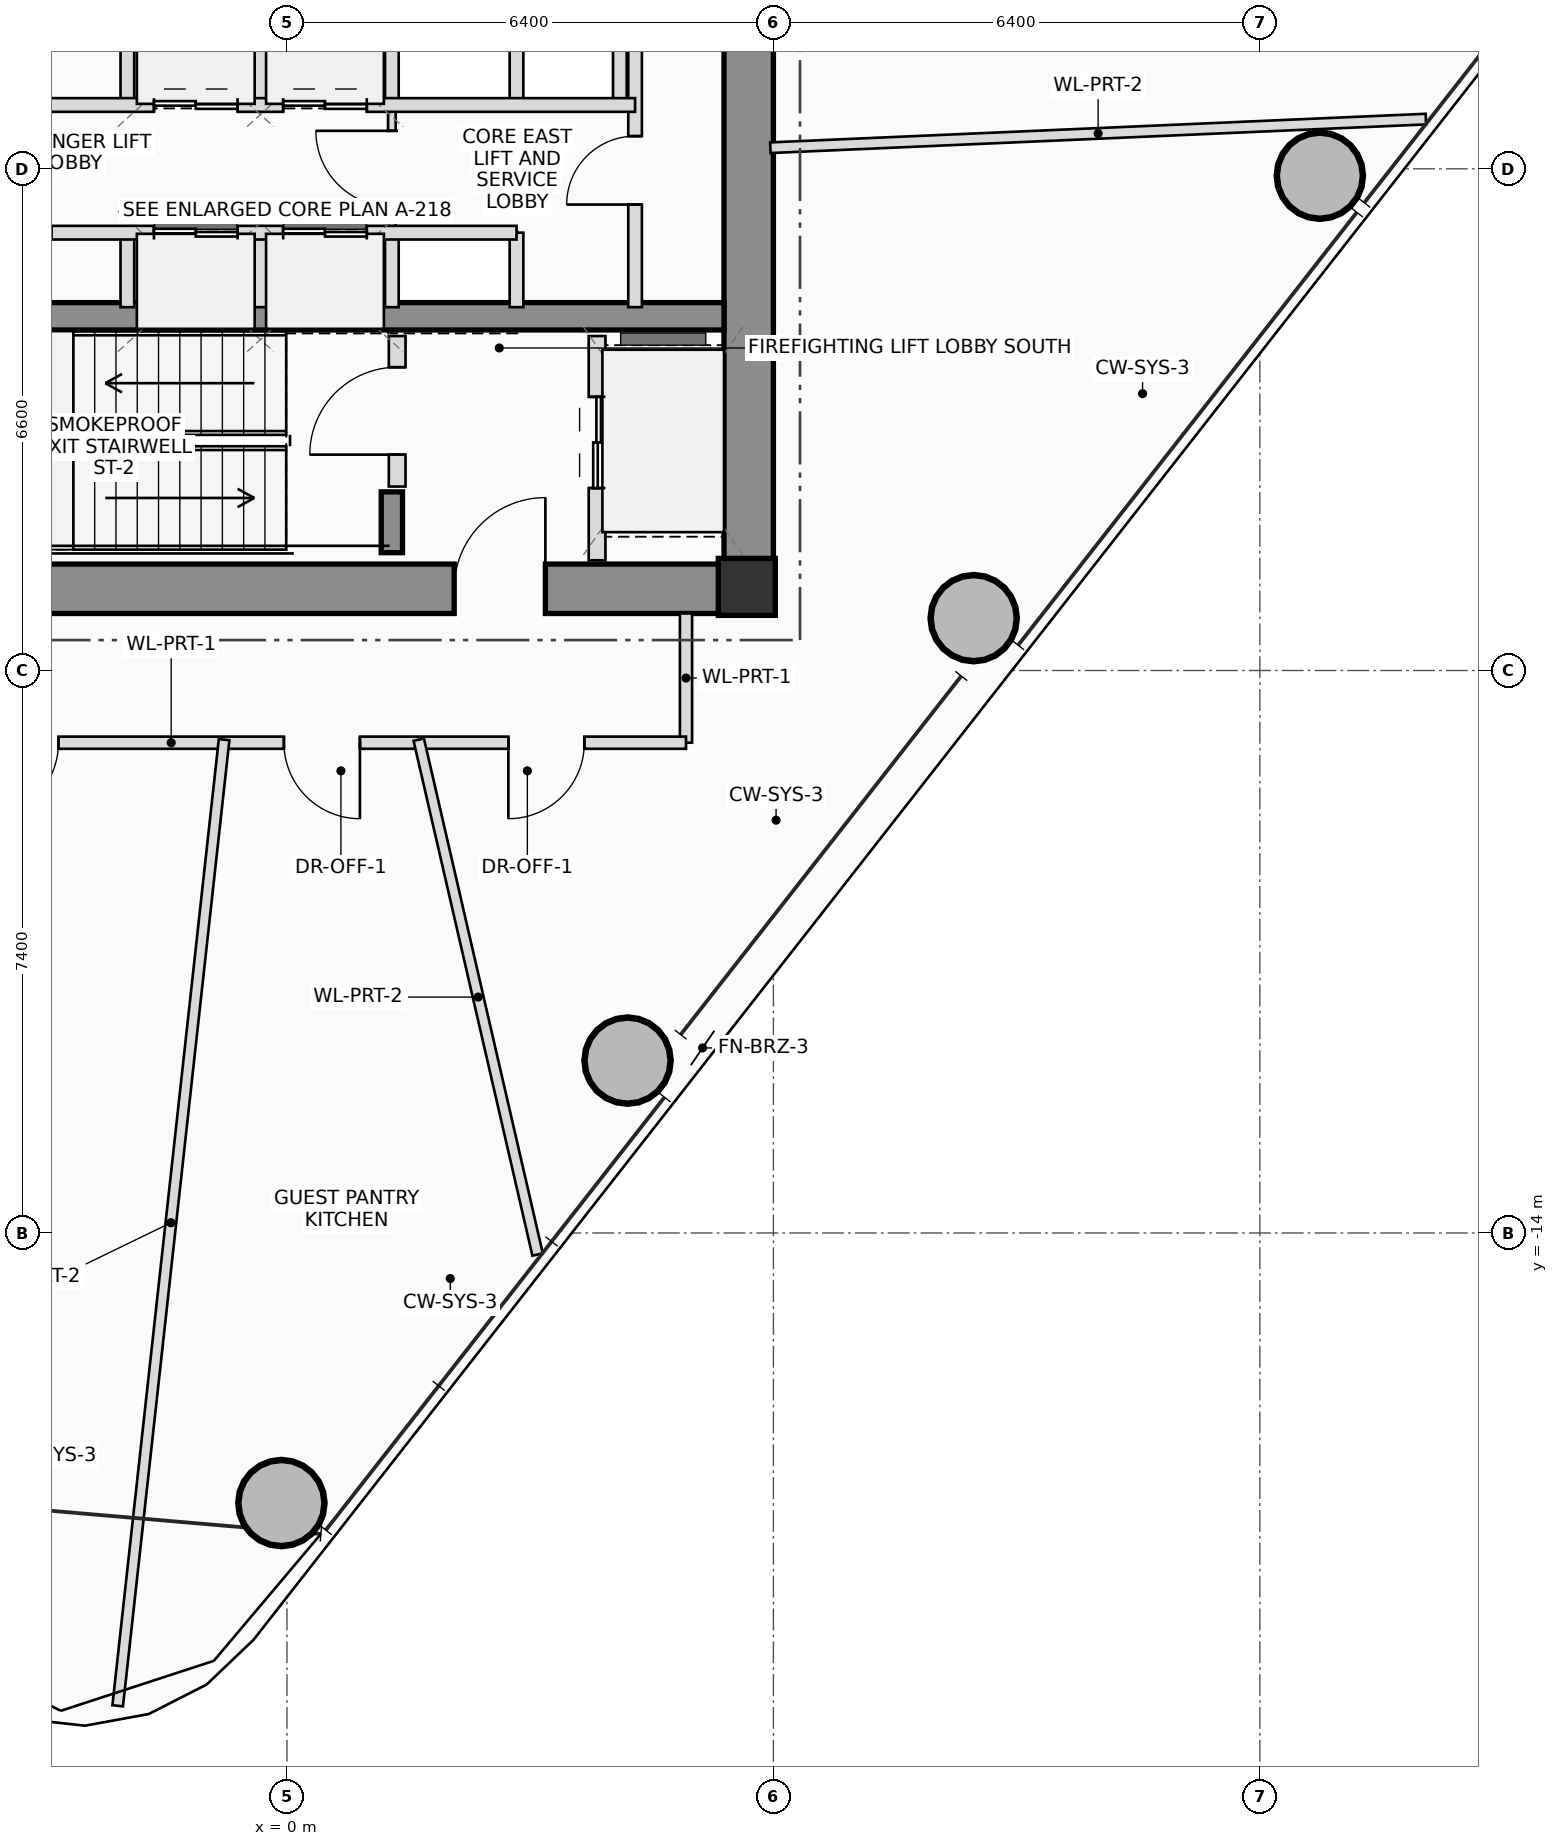
"""IFC4 building model, lengths in metres.
Left out: names, types, materials, properties, quantities, classifications, styles, units other than length and angle.
Written with IfcOpenShell. Run it as: python <this file> out.ifc"""

import sys

from ifc_helpers import new_model, si_unit, direction, frame, frame_2d, origin, origin_2d, place, context, subcontext, project, spatial, rectangle, hollow_circle, extrude, source, transform, mapped, element, fill, save


model = new_model("IFC4")
c1 = context("Model", 3, precision=1e-05, world=origin(), true_north=direction((0.0, 1.0)))
c2 = subcontext(c1, "Body", "Model", "MODEL_VIEW")
j1 = project(units=[si_unit("LENGTHUNIT", "METRE"), si_unit("PLANEANGLEUNIT", "RADIAN")], contexts=[c1])
p1 = place(None, origin())
s1 = spatial("IfcSite", under=j1, at=p1, CompositionType="ELEMENT")
p2 = place(p1, origin())
s2 = spatial("IfcBuilding", under=s1, at=p2, CompositionType="ELEMENT")
p3 = place(p2, frame((0.0, 0.0, 205.25)))
s3 = spatial("IfcBuildingStorey", under=s2, at=p3, CompositionType="ELEMENT", Elevation=205.25)
m1 = source(origin(), c2, "Body", "SweptSolid", [
    extrude(rectangle(XDim=0.75, YDim=0.75, at=origin_2d()), origin(), (0.0, 0.0, 1.0), 3.45),
])
p4 = place(p3, frame((6.05, -5.5, 0.0), z_axis=(0.0, 0.0, 1.0), x_axis=(1.0, 0.0, 0.0)))
e1 = element("IfcColumn", 1, at=p4, inside=s3, PredefinedType="COLUMN", context=c2, shape_type="MappedRepresentation", body=[
    mapped(m1, transform((0.0, 0.0, 0.0), scale=1.0)),
])
p5 = place(p3, frame((-6.4, -5.525, 0.0), z_axis=(0.0, 0.0, 1.0), x_axis=(1.0, 0.0, 0.0)))
e2 = element("IfcWall", 2, at=p5, inside=s3, PredefinedType="SHEAR", context=c2, shape_type="SweptSolid", body=[
    extrude(rectangle(XDim=12.8, YDim=0.65, at=frame_2d((6.4, 0.0))), origin(), (0.0, 0.0, 1.0), 3.45),
])
p6 = place(p5, frame((8.6, 0.0, 0.0)))
e3 = element("IfcOpeningElement", 3, at=p6, cuts=e2, PredefinedType="OPENING", context=c2, shape_type="SweptSolid", body=[
    extrude(rectangle(XDim=1.2, YDim=2.2, at=frame_2d((0.6, 1.1))), frame((0.0, 0.335, 0.0), z_axis=(0.0, -1.0, 0.0), x_axis=(1.0, 0.0, 0.0)), (0.0, 0.0, 1.0), 0.67),
])
p7 = place(p3, frame((6.075, -5.2, 0.0), z_axis=(0.0, 0.0, 1.0), x_axis=(0.0, 1.0, 0.0)))
e4 = element("IfcWall", 4, at=p7, inside=s3, PredefinedType="SHEAR", context=c2, shape_type="SweptSolid", body=[
    extrude(rectangle(XDim=10.4, YDim=0.65, at=frame_2d((5.2, 0.0))), origin(), (0.0, 0.0, 1.0), 3.45),
])
p8 = place(p3, frame((-5.75, -1.94, 0.0), z_axis=(0.0, 0.0, 1.0), x_axis=(1.0, 0.0, 0.0)))
e5 = element("IfcWall", 5, at=p8, inside=s3, PredefinedType="SHEAR", context=c2, shape_type="SweptSolid", body=[
    extrude(rectangle(XDim=11.5, YDim=0.36, at=frame_2d((5.75, 0.0))), origin(), (0.0, 0.0, 1.0), 3.45),
])
p9 = place(p3, frame((1.38, -5.05, 0.0), z_axis=(0.0, 0.0, 1.0), x_axis=(0.0, 1.0, 0.0)))
e6 = element("IfcWall", 6, at=p9, inside=s3, PredefinedType="SHEAR", context=c2, shape_type="SweptSolid", body=[
    extrude(rectangle(XDim=0.8, YDim=0.28, at=frame_2d((0.4, 0.0))), origin(), (0.0, 0.0, 1.0), 3.45),
])
m2 = source(origin(), c2, "Body", "SweptSolid", [
    extrude(hollow_circle(Radius=0.575, WallThickness=0.042, at=origin_2d()), origin(), (0.0, 0.0, 1.0), 3.45),
])
for number, where, z_axis, x_axis in (
    (7, (-0.073, -17.553, 0.0), (0.0, 0.0, 1.0), (1.0, 0.0, 0.0)),
    (8, (4.481, -11.732, 0.0), (0.0, 0.0, 1.0), (1.0, 0.0, 0.0)),
    (9, (9.035, -5.911, 0.0), (0.0, 0.0, 1.0), (1.0, 0.0, 0.0)),
    (10, (13.59, -0.09, 0.0), (0.0, 0.0, 1.0), (1.0, 0.0, 0.0)),
):
    element("IfcColumn", number, at=place(p3, frame(where, z_axis=z_axis, x_axis=x_axis)), inside=s3, PredefinedType="COLUMN", context=c2, shape_type="MappedRepresentation", body=[
        mapped(m2, transform((0.0, 0.0, 0.0), scale=1.0)),
    ])
p10 = place(p3, frame((1.45, -4.18, 0.0), z_axis=(0.0, 0.0, 1.0), x_axis=(0.0, 1.0, 0.0)))
e11 = element("IfcWall", 11, at=p10, inside=s3, PredefinedType="PLUMBINGWALL", context=c2, shape_type="SweptSolid", body=[
    extrude(rectangle(XDim=1.98, YDim=0.22, at=frame_2d((0.99, 0.0))), origin(), (0.0, 0.0, 1.0), 3.25),
])
p11 = place(p10, frame((0.42, 0.0, 0.0)))
e12 = element("IfcOpeningElement", 12, at=p11, cuts=e11, PredefinedType="OPENING", context=c2, shape_type="SweptSolid", body=[
    extrude(rectangle(XDim=1.15, YDim=2.15, at=frame_2d((0.575, 1.075))), frame((0.0, 0.12, 0.0), z_axis=(0.0, -1.0, 0.0), x_axis=(1.0, 0.0, 0.0)), (0.0, 0.0, 1.0), 0.24),
])
p12 = place(p3, frame((4.08, -5.15, 0.0), z_axis=(0.0, 0.0, 1.0), x_axis=(0.0, 1.0, 0.0)))
e13 = element("IfcWall", 13, at=p12, inside=s3, PredefinedType="PLUMBINGWALL", context=c2, shape_type="SweptSolid", body=[
    extrude(rectangle(XDim=2.95, YDim=0.22, at=frame_2d((1.475, 0.0))), origin(), (0.0, 0.0, 1.0), 3.25),
])
p13 = place(p12, frame((0.95, 0.0, 0.0)))
e14 = element("IfcOpeningElement", 14, at=p13, cuts=e13, PredefinedType="OPENING", context=c2, shape_type="SweptSolid", body=[
    extrude(rectangle(XDim=1.2, YDim=2.25, at=frame_2d((0.6, 1.125))), frame((0.0, 0.12, 0.0), z_axis=(0.0, -1.0, 0.0), x_axis=(1.0, 0.0, 0.0)), (0.0, 0.0, 1.0), 0.24),
])
p14 = place(p3, frame((1.38, -0.84, 0.0), z_axis=(0.0, 0.0, 1.0), x_axis=(0.0, 1.0, 0.0)))
e15 = element("IfcWall", 15, at=p14, inside=s3, PredefinedType="PARTITIONING", context=c2, shape_type="SweptSolid", body=[
    extrude(rectangle(XDim=1.68, YDim=0.1, at=frame_2d((0.84, 0.0))), origin(), (0.0, 0.0, 1.0), 3.25),
])
p15 = place(p14, frame((0.34, 0.0, 0.0)))
e16 = element("IfcOpeningElement", 16, at=p15, cuts=e15, PredefinedType="OPENING", context=c2, shape_type="SweptSolid", body=[
    extrude(rectangle(XDim=1.0, YDim=2.25, at=frame_2d((0.5, 1.125))), frame((0.0, 0.06, 0.0), z_axis=(0.0, -1.0, 0.0), x_axis=(1.0, 0.0, 0.0)), (0.0, 0.0, 1.0), 0.12),
])
for number, where, z_axis, x_axis in (
    (17, (-2.1, 0.84, 0.0), (0.0, 0.0, 1.0), (0.0, 1.0, 0.0)),
    (18, (-2.1, -1.82, 0.0), (0.0, 0.0, 1.0), (0.0, 1.0, 0.0)),
    (19, (-0.35, 0.84, 0.0), (0.0, 0.0, 1.0), (0.0, 1.0, 0.0)),
    (20, (-0.35, -1.82, 0.0), (0.0, 0.0, 1.0), (0.0, 1.0, 0.0)),
    (21, (1.38, 0.84, 0.0), (0.0, 0.0, 1.0), (0.0, 1.0, 0.0)),
    (22, (1.38, -1.82, 0.0), (0.0, 0.0, 1.0), (0.0, 1.0, 0.0)),
    (23, (3.02, 0.84, 0.0), (0.0, 0.0, 1.0), (0.0, 1.0, 0.0)),
    (24, (4.38, 0.84, 0.0), (0.0, 0.0, 1.0), (0.0, 1.0, 0.0)),
    (25, (3.02, -1.82, 0.0), (0.0, 0.0, 1.0), (0.0, 1.0, 0.0)),
):
    element("IfcWall", number, at=place(p3, frame(where, z_axis=z_axis, x_axis=x_axis)), inside=s3, PredefinedType="PLUMBINGWALL", context=c2, shape_type="SweptSolid", body=[
        extrude(rectangle(XDim=0.98, YDim=0.18, at=frame_2d((0.49, 0.0))), origin(), (0.0, 0.0, 1.0), 3.25),
    ])
p16 = place(p3, frame((4.58, -1.82, 0.0), z_axis=(0.0, 0.0, 1.0), x_axis=(0.0, 1.0, 0.0)))
e26 = element("IfcWall", 26, at=p16, inside=s3, PredefinedType="PLUMBINGWALL", context=c2, shape_type="SweptSolid", body=[
    extrude(rectangle(XDim=3.64, YDim=0.18, at=frame_2d((1.82, 0.0))), origin(), (0.0, 0.0, 1.0), 3.25),
])
p17 = place(p16, frame((1.35, 0.0, 0.0)))
e27 = element("IfcOpeningElement", 27, at=p17, cuts=e26, PredefinedType="OPENING", context=c2, shape_type="SweptSolid", body=[
    extrude(rectangle(XDim=0.9, YDim=2.05, at=frame_2d((0.45, 1.025))), frame((0.0, 0.1, 0.0), z_axis=(0.0, -1.0, 0.0), x_axis=(1.0, 0.0, 0.0)), (0.0, 0.0, 1.0), 0.2),
])
p18 = place(p3, frame((-5.68, 0.84, 0.0), z_axis=(0.0, 0.0, 1.0), x_axis=(1.0, 0.0, 0.0)))
e28 = element("IfcWall", 28, at=p18, inside=s3, PredefinedType="PLUMBINGWALL", context=c2, shape_type="SweptSolid", body=[
    extrude(rectangle(XDim=10.26, YDim=0.18, at=frame_2d((5.13, 0.0))), origin(), (0.0, 0.0, 1.0), 3.25),
])
p19 = place(p18, frame((1.08, 0.0, 0.0)))
e29 = element("IfcOpeningElement", 29, at=p19, cuts=e28, PredefinedType="OPENING", context=c2, shape_type="SweptSolid", body=[
    extrude(rectangle(XDim=0.9, YDim=2.05, at=frame_2d((0.45, 1.025))), frame((0.0, 0.1, 0.0), z_axis=(0.0, -1.0, 0.0), x_axis=(1.0, 0.0, 0.0)), (0.0, 0.0, 1.0), 0.2),
])
p20 = place(p18, frame((3.93, 0.0, 0.0)))
e30 = element("IfcOpeningElement", 30, at=p20, cuts=e28, PredefinedType="OPENING", context=c2, shape_type="SweptSolid", body=[
    extrude(rectangle(XDim=1.1, YDim=2.2, at=frame_2d((0.55, 1.1))), frame((0.0, 0.1, 0.0), z_axis=(0.0, -1.0, 0.0), x_axis=(1.0, 0.0, 0.0)), (0.0, 0.0, 1.0), 0.2),
])
p21 = place(p18, frame((5.63, 0.0, 0.0)))
e31 = element("IfcOpeningElement", 31, at=p21, cuts=e28, PredefinedType="OPENING", context=c2, shape_type="SweptSolid", body=[
    extrude(rectangle(XDim=1.1, YDim=2.2, at=frame_2d((0.55, 1.1))), frame((0.0, 0.1, 0.0), z_axis=(0.0, -1.0, 0.0), x_axis=(1.0, 0.0, 0.0)), (0.0, 0.0, 1.0), 0.2),
])
p22 = place(p3, frame((-5.68, -0.84, 0.0), z_axis=(0.0, 0.0, 1.0), x_axis=(1.0, 0.0, 0.0)))
e32 = element("IfcWall", 32, at=p22, inside=s3, PredefinedType="PLUMBINGWALL", context=c2, shape_type="SweptSolid", body=[
    extrude(rectangle(XDim=8.7, YDim=0.18, at=frame_2d((4.35, 0.0))), origin(), (0.0, 0.0, 1.0), 3.25),
])
p23 = place(p22, frame((1.68, 0.0, 0.0)))
e33 = element("IfcOpeningElement", 33, at=p23, cuts=e32, PredefinedType="OPENING", context=c2, shape_type="SweptSolid", body=[
    extrude(rectangle(XDim=0.9, YDim=2.05, at=frame_2d((0.45, 1.025))), frame((0.0, 0.1, 0.0), z_axis=(0.0, -1.0, 0.0), x_axis=(1.0, 0.0, 0.0)), (0.0, 0.0, 1.0), 0.2),
])
p24 = place(p22, frame((3.93, 0.0, 0.0)))
e34 = element("IfcOpeningElement", 34, at=p24, cuts=e32, PredefinedType="OPENING", context=c2, shape_type="SweptSolid", body=[
    extrude(rectangle(XDim=1.1, YDim=2.2, at=frame_2d((0.55, 1.1))), frame((0.0, 0.1, 0.0), z_axis=(0.0, -1.0, 0.0), x_axis=(1.0, 0.0, 0.0)), (0.0, 0.0, 1.0), 0.2),
])
p25 = place(p22, frame((5.63, 0.0, 0.0)))
e35 = element("IfcOpeningElement", 35, at=p25, cuts=e32, PredefinedType="OPENING", context=c2, shape_type="SweptSolid", body=[
    extrude(rectangle(XDim=1.1, YDim=2.2, at=frame_2d((0.55, 1.1))), frame((0.0, 0.1, 0.0), z_axis=(0.0, -1.0, 0.0), x_axis=(1.0, 0.0, 0.0)), (0.0, 0.0, 1.0), 0.2),
])
p26 = place(p3, frame((5.25, -5.85, 0.0), z_axis=(0.0, 0.0, 1.0), x_axis=(0.0, -1.0, 0.0)))
e36 = element("IfcWall", 36, at=p26, inside=s3, PredefinedType="PARTITIONING", context=c2, shape_type="SweptSolid", body=[
    extrude(rectangle(XDim=1.7, YDim=0.16, at=frame_2d((0.85, 0.0))), origin(), (0.0, 0.0, 1.0), 3.25),
])
p27 = place(p3, frame((5.25, -7.55, 0.0), z_axis=(0.0, 0.0, 1.0), x_axis=(-1.0, 0.0, 0.0)))
e37 = element("IfcWall", 37, at=p27, inside=s3, PredefinedType="PARTITIONING", context=c2, shape_type="SweptSolid", body=[
    extrude(rectangle(XDim=11.61, YDim=0.16, at=frame_2d((5.805, 0.0))), origin(), (0.0, 0.0, 1.0), 2.605),
])
p28 = place(p27, frame((1.337, 0.0, 0.0)))
e38 = element("IfcOpeningElement", 38, at=p28, cuts=e37, PredefinedType="OPENING", context=c2, shape_type="SweptSolid", body=[
    extrude(rectangle(XDim=1.0, YDim=2.25, at=frame_2d((0.5, 1.125))), frame((0.0, 0.09, 0.0), z_axis=(0.0, -1.0, 0.0), x_axis=(1.0, 0.0, 0.0)), (0.0, 0.0, 1.0), 0.18),
])
p29 = place(p27, frame((4.29, 0.0, 0.0)))
e39 = element("IfcOpeningElement", 39, at=p29, cuts=e37, PredefinedType="OPENING", context=c2, shape_type="SweptSolid", body=[
    extrude(rectangle(XDim=1.0, YDim=2.25, at=frame_2d((0.5, 1.125))), frame((0.0, 0.09, 0.0), z_axis=(0.0, -1.0, 0.0), x_axis=(1.0, 0.0, 0.0)), (0.0, 0.0, 1.0), 0.18),
])
p30 = place(p27, frame((8.256, 0.0, 0.0)))
e40 = element("IfcOpeningElement", 40, at=p30, cuts=e37, PredefinedType="OPENING", context=c2, shape_type="SweptSolid", body=[
    extrude(rectangle(XDim=1.0, YDim=2.25, at=frame_2d((0.5, 1.125))), frame((0.0, 0.09, 0.0), z_axis=(0.0, -1.0, 0.0), x_axis=(1.0, 0.0, 0.0)), (0.0, 0.0, 1.0), 0.18),
])
p31 = place(p3, frame((6.36, 0.278, 0.0), z_axis=(0.0, 0.0, 1.0), x_axis=(0.999047440648, 0.043637270025, 0.0)))
e41 = element("IfcWall", 41, at=p31, inside=s3, PredefinedType="PARTITIONING", context=c2, shape_type="SweptSolid", body=[
    extrude(rectangle(XDim=8.633, YDim=0.14, at=frame_2d((4.316, 0.0))), origin(), (0.0, 0.0, 1.0), 2.605),
])
p32 = place(p3, frame((-0.827, -7.51, 0.0), z_axis=(0.0, 0.0, 1.0), x_axis=(-0.109492708445, -0.993987598915, 0.0)))
e42 = element("IfcWall", 42, at=p32, inside=s3, PredefinedType="PARTITIONING", context=c2, shape_type="SweptSolid", body=[
    extrude(rectangle(XDim=12.788, YDim=0.14, at=frame_2d((6.394, 0.0))), origin(), (0.0, 0.0, 1.0), 2.605),
])
p33 = place(p3, frame((1.734, -7.51, 0.0), z_axis=(0.0, 0.0, 1.0), x_axis=(0.224951847052, -0.974369881774, 0.0)))
e43 = element("IfcWall", 43, at=p33, inside=s3, PredefinedType="PARTITIONING", context=c2, shape_type="SweptSolid", body=[
    extrude(rectangle(XDim=6.951, YDim=0.14, at=frame_2d((3.476, 0.0))), origin(), (0.0, 0.0, 1.0), 2.765),
])
p34 = place(p6, origin())
e44 = element("IfcDoor", 44, at=p34, inside=s3, OperationType="SINGLE_SWING_RIGHT", PredefinedType="DOOR", context=c2, shape_type="SweptSolid", body=[
    extrude(rectangle(XDim=1.2, YDim=2.2, at=frame_2d((0.6, 1.1))), frame((0.0, 0.025, 0.0), z_axis=(0.0, -1.0, 0.0), x_axis=(1.0, 0.0, 0.0)), (0.0, 0.0, 1.0), 0.05),
])
fill(e3, e44)
p35 = place(p11, origin())
e45 = element("IfcDoor", 45, at=p35, inside=s3, OperationType="SINGLE_SWING_LEFT", PredefinedType="DOOR", context=c2, shape_type="SweptSolid", body=[
    extrude(rectangle(XDim=1.15, YDim=2.15, at=frame_2d((0.575, 1.075))), frame((0.0, 0.025, 0.0), z_axis=(0.0, -1.0, 0.0), x_axis=(1.0, 0.0, 0.0)), (0.0, 0.0, 1.0), 0.05),
])
fill(e12, e45)
p36 = place(p13, origin())
e46 = element("IfcDoor", 46, at=p36, inside=s3, OperationType="DOUBLE_DOOR_SLIDING", PredefinedType="DOOR", context=c2, shape_type="SweptSolid", body=[
    extrude(rectangle(XDim=1.2, YDim=2.25, at=frame_2d((0.6, 1.125))), frame((0.0, 0.025, 0.0), z_axis=(0.0, -1.0, 0.0), x_axis=(1.0, 0.0, 0.0)), (0.0, 0.0, 1.0), 0.05),
])
fill(e14, e46)
p37 = place(p15, origin())
e47 = element("IfcDoor", 47, at=p37, inside=s3, OperationType="SINGLE_SWING_RIGHT", PredefinedType="DOOR", context=c2, shape_type="SweptSolid", body=[
    extrude(rectangle(XDim=1.0, YDim=2.25, at=frame_2d((0.5, 1.125))), frame((0.0, 0.025, 0.0), z_axis=(0.0, -1.0, 0.0), x_axis=(1.0, 0.0, 0.0)), (0.0, 0.0, 1.0), 0.05),
])
fill(e16, e47)
p38 = place(p17, origin())
e48 = element("IfcDoor", 48, at=p38, inside=s3, OperationType="SINGLE_SWING_LEFT", PredefinedType="DOOR", context=c2, shape_type="SweptSolid", body=[
    extrude(rectangle(XDim=0.9, YDim=2.05, at=frame_2d((0.45, 1.025))), frame((0.0, 0.025, 0.0), z_axis=(0.0, -1.0, 0.0), x_axis=(1.0, 0.0, 0.0)), (0.0, 0.0, 1.0), 0.05),
])
fill(e27, e48)
p39 = place(p20, origin())
e49 = element("IfcDoor", 49, at=p39, inside=s3, OperationType="DOUBLE_DOOR_SLIDING", PredefinedType="DOOR", context=c2, shape_type="SweptSolid", body=[
    extrude(rectangle(XDim=1.1, YDim=2.2, at=frame_2d((0.55, 1.1))), frame((0.0, 0.025, 0.0), z_axis=(0.0, -1.0, 0.0), x_axis=(1.0, 0.0, 0.0)), (0.0, 0.0, 1.0), 0.05),
])
fill(e30, e49)
p40 = place(p21, origin())
e50 = element("IfcDoor", 50, at=p40, inside=s3, OperationType="DOUBLE_DOOR_SLIDING", PredefinedType="DOOR", context=c2, shape_type="SweptSolid", body=[
    extrude(rectangle(XDim=1.1, YDim=2.2, at=frame_2d((0.55, 1.1))), frame((0.0, 0.025, 0.0), z_axis=(0.0, -1.0, 0.0), x_axis=(1.0, 0.0, 0.0)), (0.0, 0.0, 1.0), 0.05),
])
fill(e31, e50)
p41 = place(p24, origin())
e51 = element("IfcDoor", 51, at=p41, inside=s3, OperationType="DOUBLE_DOOR_SLIDING", PredefinedType="DOOR", context=c2, shape_type="SweptSolid", body=[
    extrude(rectangle(XDim=1.1, YDim=2.2, at=frame_2d((0.55, 1.1))), frame((0.0, 0.025, 0.0), z_axis=(0.0, -1.0, 0.0), x_axis=(1.0, 0.0, 0.0)), (0.0, 0.0, 1.0), 0.05),
])
fill(e34, e51)
p42 = place(p25, origin())
e52 = element("IfcDoor", 52, at=p42, inside=s3, OperationType="DOUBLE_DOOR_SLIDING", PredefinedType="DOOR", context=c2, shape_type="SweptSolid", body=[
    extrude(rectangle(XDim=1.1, YDim=2.2, at=frame_2d((0.55, 1.1))), frame((0.0, 0.025, 0.0), z_axis=(0.0, -1.0, 0.0), x_axis=(1.0, 0.0, 0.0)), (0.0, 0.0, 1.0), 0.05),
])
fill(e35, e52)
p43 = place(p28, origin())
e53 = element("IfcDoor", 53, at=p43, inside=s3, OperationType="SINGLE_SWING_RIGHT", PredefinedType="DOOR", context=c2, shape_type="SweptSolid", body=[
    extrude(rectangle(XDim=1.0, YDim=2.25, at=frame_2d((0.5, 1.125))), frame((0.0, 0.025, 0.0), z_axis=(0.0, -1.0, 0.0), x_axis=(1.0, 0.0, 0.0)), (0.0, 0.0, 1.0), 0.05),
])
fill(e38, e53)
p44 = place(p29, origin())
e54 = element("IfcDoor", 54, at=p44, inside=s3, OperationType="SINGLE_SWING_LEFT", PredefinedType="DOOR", context=c2, shape_type="SweptSolid", body=[
    extrude(rectangle(XDim=1.0, YDim=2.25, at=frame_2d((0.5, 1.125))), frame((0.0, 0.025, 0.0), z_axis=(0.0, -1.0, 0.0), x_axis=(1.0, 0.0, 0.0)), (0.0, 0.0, 1.0), 0.05),
])
fill(e39, e54)
p45 = place(p30, origin())
e55 = element("IfcDoor", 55, at=p45, inside=s3, OperationType="SINGLE_SWING_RIGHT", PredefinedType="DOOR", context=c2, shape_type="SweptSolid", body=[
    extrude(rectangle(XDim=1.0, YDim=2.25, at=frame_2d((0.5, 1.125))), frame((0.0, 0.025, 0.0), z_axis=(0.0, -1.0, 0.0), x_axis=(1.0, 0.0, 0.0)), (0.0, 0.0, 1.0), 0.05),
])
fill(e40, e55)
save(model, sys.argv[1])
